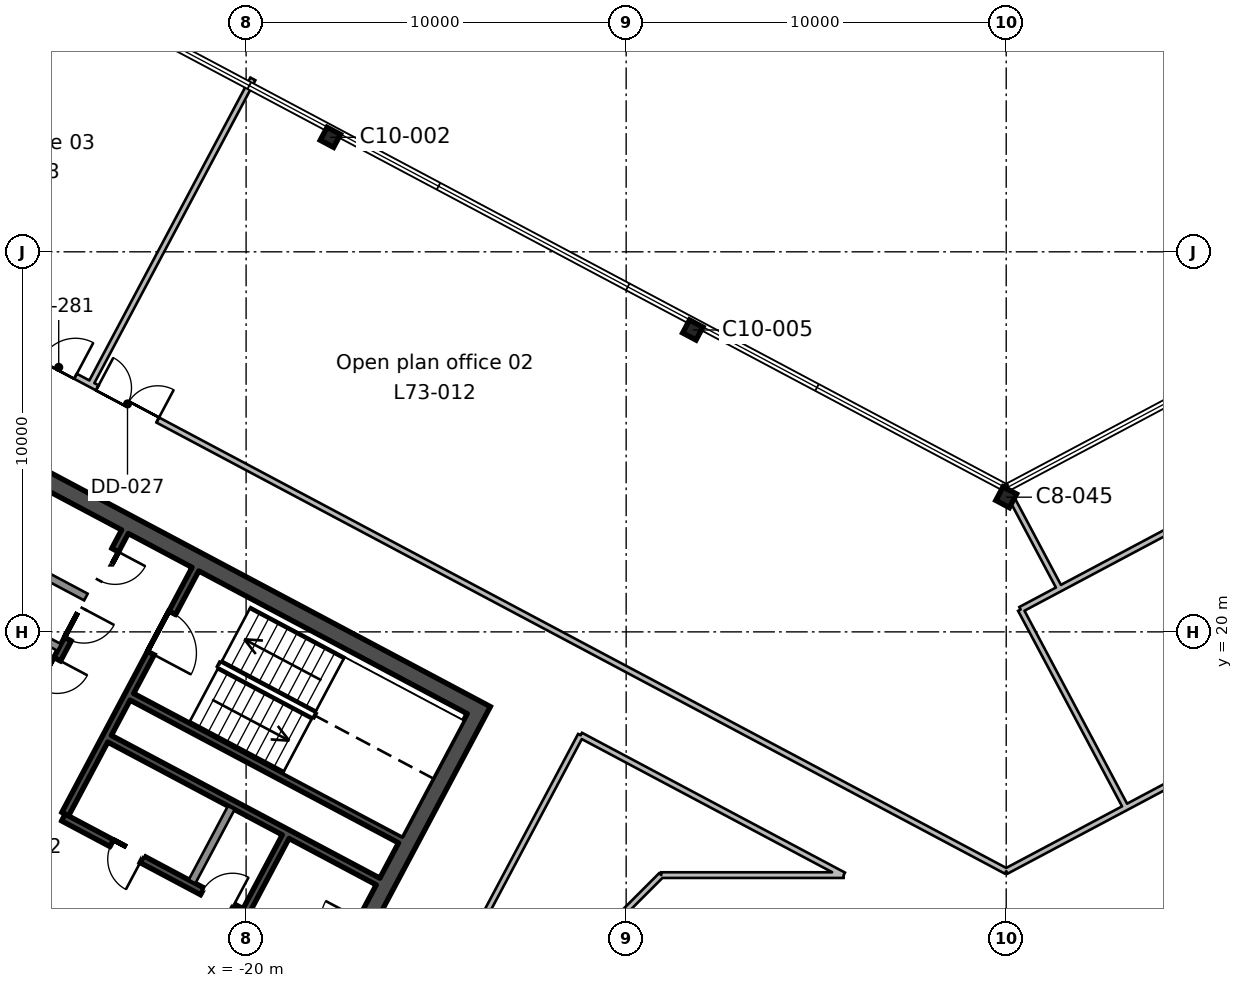
"""IFC4 building model, lengths in metres.
Left out: names, types, materials, properties, quantities, classifications, styles, units other than length and angle.
Written with IfcOpenShell. Run it as: python <this file> out.ifc"""

import sys

from ifc_helpers import new_model, si_unit, direction, frame, frame_2d, origin, origin_2d, place, context, subcontext, project, spatial, rectangle, i_section, extrude, element, fill, save


model = new_model("IFC4")
c1 = context("Model", 3, precision=1e-05, world=origin(), true_north=direction((0.0, 1.0)))
c2 = subcontext(c1, "Body", "Model", "MODEL_VIEW")
j1 = project(units=[si_unit("LENGTHUNIT", "METRE"), si_unit("PLANEANGLEUNIT", "RADIAN")], contexts=[c1])
p1 = place(None, origin())
s1 = spatial("IfcSite", under=j1, at=p1, CompositionType="ELEMENT")
p2 = place(p1, origin())
s2 = spatial("IfcBuilding", under=s1, at=p2, CompositionType="ELEMENT")
p3 = place(p2, frame((0.0, 0.0, 320.4)))
s3 = spatial("IfcBuildingStorey", under=s2, at=p3, CompositionType="ELEMENT", Elevation=320.4)
p4 = place(p3, frame((0.0, 23.544, 0.0), z_axis=(0.0, 0.0, 1.0), x_axis=(-0.882947592859, 0.469471562786, 0.0)))
e1 = element("IfcColumn", 1, at=p4, inside=s3, PredefinedType="COLUMN", context=c2, shape_type="SweptSolid", body=[
    extrude(i_section(OverallWidth=0.404, OverallDepth=0.406, WebThickness=0.027, FlangeThickness=0.044, FilletRadius=0.015, at=origin_2d()), origin(), (0.0, 0.0, 1.0), 3.9),
])
for number, where, z_axis, x_axis in (
    (2, (-8.247, 27.943, 0.0), (0.0, 0.0, 1.0), (-0.883, 0.469, 0.0)),
    (3, (-17.783, 33.013, 0.0), (0.0, 0.0, 1.0), (-0.883, 0.469, 0.0)),
):
    element("IfcColumn", number, at=place(p3, frame(where, z_axis=z_axis, x_axis=x_axis)), inside=s3, PredefinedType="COLUMN", context=c2, shape_type="SweptSolid", body=[
        extrude(i_section(OverallWidth=0.399, OverallDepth=0.386, WebThickness=0.021, FlangeThickness=0.033, FilletRadius=0.015, at=origin_2d()), origin(), (0.0, 0.0, 1.0), 3.9),
    ])
p5 = place(p3, frame((-13.771, 18.138, 0.0), z_axis=(0.0, 0.0, 1.0), x_axis=(-0.469467968382, -0.882949504028, 0.0)))
e4 = element("IfcWall", 4, at=p5, inside=s3, PredefinedType="SHEAR", context=c2, shape_type="SweptSolid", body=[
    extrude(rectangle(XDim=19.1, YDim=0.45, at=frame_2d((9.55, 0.0))), origin(), (0.0, 0.0, 1.0), 3.9),
])
p6 = place(p5, frame((6.55, 0.0, 0.0)))
e5 = element("IfcOpeningElement", 5, at=p6, cuts=e4, PredefinedType="OPENING", context=c2, shape_type="SweptSolid", body=[
    extrude(rectangle(XDim=2.4, YDim=2.4, at=frame_2d((1.2, 1.2))), frame((0.0, 0.235, 0.0), z_axis=(0.0, -1.0, 0.0), x_axis=(1.0, 0.0, 0.0)), (0.0, 0.0, 1.0), 0.47),
])
p7 = place(p3, frame((-14.076, 18.045, 0.0), z_axis=(0.0, 0.0, 1.0), x_axis=(-0.882947755831, 0.46947125628, 0.0)))
e6 = element("IfcWall", 6, at=p7, inside=s3, PredefinedType="SHEAR", context=c2, shape_type="SweptSolid", body=[
    extrude(rectangle(XDim=20.2, YDim=0.45, at=frame_2d((10.1, 0.0))), origin(), (0.0, 0.0, 1.0), 3.9),
])
p8 = place(p3, frame((-18.96, 14.611, 0.0), z_axis=(0.0, 0.0, 1.0), x_axis=(-0.4694473164, -0.882960484464, 0.0)))
e7 = element("IfcWall", 7, at=p8, inside=s3, PredefinedType="SHEAR", context=c2, shape_type="SweptSolid", body=[
    extrude(rectangle(XDim=2.2, YDim=0.2, at=frame_2d((1.1, 0.0))), origin(), (0.0, 0.0, 1.0), 3.9),
])
p9 = place(p3, frame((-20.39, 15.372, 0.0), z_axis=(0.0, 0.0, 1.0), x_axis=(-0.4694473164, -0.882960484464, 0.0)))
e8 = element("IfcWall", 8, at=p9, inside=s3, PredefinedType="SOLIDWALL", context=c2, shape_type="SweptSolid", body=[
    extrude(rectangle(XDim=2.2, YDim=0.2, at=frame_2d((1.1, 0.0))), origin(), (0.0, 0.0, 1.0), 3.9),
])
p10 = place(p3, frame((-21.333, 21.649, 0.0), z_axis=(0.0, 0.0, 1.0), x_axis=(-0.469494272526, -0.882935517501, 0.0)))
e9 = element("IfcWall", 9, at=p10, inside=s3, PredefinedType="SHEAR", context=c2, shape_type="SweptSolid", body=[
    extrude(rectangle(XDim=7.3, YDim=0.2, at=frame_2d((3.65, 0.0))), origin(), (0.0, 0.0, 1.0), 3.9),
])
p11 = place(p10, frame((1.3, 0.0, 0.0)))
e10 = element("IfcOpeningElement", 10, at=p11, cuts=e9, PredefinedType="OPENING", context=c2, shape_type="SweptSolid", body=[
    extrude(rectangle(XDim=1.2, YDim=2.1, at=frame_2d((0.6, 1.05))), frame((0.0, 0.11, 0.0), z_axis=(0.0, -1.0, 0.0), x_axis=(1.0, 0.0, 0.0)), (0.0, 0.0, 1.0), 0.22),
])
p12 = place(p3, frame((-23.188, 22.635, 0.0), z_axis=(0.0, 0.0, 1.0), x_axis=(-0.469454336211, -0.882956752176, 0.0)))
e11 = element("IfcWall", 11, at=p12, inside=s3, PredefinedType="SHEAR", context=c2, shape_type="SweptSolid", body=[
    extrude(rectangle(XDim=7.3, YDim=0.2, at=frame_2d((3.65, 0.0))), origin(), (0.0, 0.0, 1.0), 3.9),
])
p13 = place(p12, frame((0.55, 0.0, 0.0)))
e12 = element("IfcOpeningElement", 12, at=p13, cuts=e11, PredefinedType="OPENING", context=c2, shape_type="SweptSolid", body=[
    extrude(rectangle(XDim=0.9, YDim=2.1, at=frame_2d((0.45, 1.05))), frame((0.0, 0.11, 0.0), z_axis=(0.0, -1.0, 0.0), x_axis=(1.0, 0.0, 0.0)), (0.0, 0.0, 1.0), 0.22),
])
p14 = place(p12, frame((2.3, 0.0, 0.0)))
e13 = element("IfcOpeningElement", 13, at=p14, cuts=e11, PredefinedType="OPENING", context=c2, shape_type="SweptSolid", body=[
    extrude(rectangle(XDim=0.9, YDim=2.1, at=frame_2d((0.45, 1.05))), frame((0.0, 0.11, 0.0), z_axis=(0.0, -1.0, 0.0), x_axis=(1.0, 0.0, 0.0)), (0.0, 0.0, 1.0), 0.22),
])
p15 = place(p12, frame((3.8, 0.0, 0.0)))
e14 = element("IfcOpeningElement", 14, at=p15, cuts=e11, PredefinedType="OPENING", context=c2, shape_type="SweptSolid", body=[
    extrude(rectangle(XDim=0.9, YDim=2.1, at=frame_2d((0.45, 1.05))), frame((0.0, 0.11, 0.0), z_axis=(0.0, -1.0, 0.0), x_axis=(1.0, 0.0, 0.0)), (0.0, 0.0, 1.0), 0.22),
])
p16 = place(p3, frame((-24.215, 20.917, 0.0), z_axis=(0.0, 0.0, 1.0), x_axis=(-0.882964314875, 0.469440111896, 0.0)))
e15 = element("IfcWall", 15, at=p16, inside=s3, PredefinedType="SOLIDWALL", context=c2, shape_type="SweptSolid", body=[
    extrude(rectangle(XDim=5.2, YDim=0.2, at=frame_2d((2.6, 0.0))), origin(), (0.0, 0.0, 1.0), 3.9),
])
p17 = place(p3, frame((-24.919, 19.592, 0.0), z_axis=(0.0, 0.0, 1.0), x_axis=(-0.882953967957, 0.469459572775, 0.0)))
e16 = element("IfcWall", 16, at=p17, inside=s3, PredefinedType="SOLIDWALL", context=c2, shape_type="SweptSolid", body=[
    extrude(rectangle(XDim=5.2, YDim=0.2, at=frame_2d((2.6, 0.0))), origin(), (0.0, 0.0, 1.0), 3.9),
])
p18 = place(p3, frame((-15.942, 14.536, 0.0), z_axis=(0.0, 0.0, 1.0), x_axis=(-0.882946947542, 0.469472776449, 0.0)))
e17 = element("IfcWall", 17, at=p18, inside=s3, PredefinedType="SHEAR", context=c2, shape_type="SweptSolid", body=[
    extrude(rectangle(XDim=8.0, YDim=0.2, at=frame_2d((4.0, 0.0))), origin(), (0.0, 0.0, 1.0), 3.9),
])
p19 = place(p3, frame((-16.529, 13.432, 0.0), z_axis=(0.0, 0.0, 1.0), x_axis=(-0.88295287151, 0.469461634952, 0.0)))
e18 = element("IfcWall", 18, at=p19, inside=s3, PredefinedType="SHEAR", context=c2, shape_type="SweptSolid", body=[
    extrude(rectangle(XDim=8.0, YDim=0.2, at=frame_2d((4.0, 0.0))), origin(), (0.0, 0.0, 1.0), 3.9),
])
p20 = place(p3, frame((-20.04, 12.581, 0.0), z_axis=(0.0, 0.0, 1.0), x_axis=(-0.882942972946, 0.469480251476, 0.0)))
e19 = element("IfcWall", 19, at=p20, inside=s3, PredefinedType="SHEAR", context=c2, shape_type="SweptSolid", body=[
    extrude(rectangle(XDim=5.4, YDim=0.2, at=frame_2d((2.7, 0.0))), origin(), (0.0, 0.0, 1.0), 3.9),
])
p21 = place(p20, frame((0.36, 0.0, 0.0)))
e20 = element("IfcOpeningElement", 20, at=p21, cuts=e19, PredefinedType="OPENING", context=c2, shape_type="SweptSolid", body=[
    extrude(rectangle(XDim=0.9, YDim=2.1, at=frame_2d((0.45, 1.05))), frame((0.0, 0.11, 0.0), z_axis=(0.0, -1.0, 0.0), x_axis=(1.0, 0.0, 0.0)), (0.0, 0.0, 1.0), 0.22),
])
p22 = place(p20, frame((3.06, 0.0, 0.0)))
e21 = element("IfcOpeningElement", 21, at=p22, cuts=e19, PredefinedType="OPENING", context=c2, shape_type="SweptSolid", body=[
    extrude(rectangle(XDim=0.9, YDim=2.1, at=frame_2d((0.45, 1.05))), frame((0.0, 0.11, 0.0), z_axis=(0.0, -1.0, 0.0), x_axis=(1.0, 0.0, 0.0)), (0.0, 0.0, 1.0), 0.22),
])
p23 = place(p3, frame((-19.252, 8.311, 0.0), z_axis=(0.0, 0.0, 1.0), x_axis=(-0.882955722218, 0.469456273365, 0.0)))
e22 = element("IfcWall", 22, at=p23, inside=s3, PredefinedType="SHEAR", context=c2, shape_type="SweptSolid", body=[
    extrude(rectangle(XDim=10.0, YDim=0.2, at=frame_2d((5.0, 0.0))), origin(), (0.0, 0.0, 1.0), 3.9),
])
p24 = place(p23, frame((2.1, 0.0, 0.0)))
e23 = element("IfcOpeningElement", 23, at=p24, cuts=e22, PredefinedType="OPENING", context=c2, shape_type="SweptSolid", body=[
    extrude(rectangle(XDim=1.2, YDim=2.1, at=frame_2d((0.6, 1.05))), frame((0.0, 0.11, 0.0), z_axis=(0.0, -1.0, 0.0), x_axis=(1.0, 0.0, 0.0)), (0.0, 0.0, 1.0), 0.22),
])
p25 = place(p23, frame((5.4, 0.0, 0.0)))
e24 = element("IfcOpeningElement", 24, at=p25, cuts=e22, PredefinedType="OPENING", context=c2, shape_type="SweptSolid", body=[
    extrude(rectangle(XDim=1.1, YDim=2.1, at=frame_2d((0.55, 1.05))), frame((0.0, 0.11, 0.0), z_axis=(0.0, -1.0, 0.0), x_axis=(1.0, 0.0, 0.0)), (0.0, 0.0, 1.0), 0.22),
])
p26 = place(p23, frame((8.1, 0.0, 0.0)))
e25 = element("IfcOpeningElement", 25, at=p26, cuts=e22, PredefinedType="OPENING", context=c2, shape_type="SweptSolid", body=[
    extrude(rectangle(XDim=1.1, YDim=2.1, at=frame_2d((0.55, 1.05))), frame((0.0, 0.11, 0.0), z_axis=(0.0, -1.0, 0.0), x_axis=(1.0, 0.0, 0.0)), (0.0, 0.0, 1.0), 0.22),
])
p27 = place(p3, frame((-48.947, 39.73, 0.0), z_axis=(0.0, 0.0, 1.0), x_axis=(0.882945454821, -0.469475583828, 0.0)))
e26 = element("IfcWall", 26, at=p27, inside=s3, PredefinedType="PARTITIONING", context=c2, shape_type="SweptSolid", body=[
    extrude(rectangle(XDim=55.436, YDim=0.15, at=frame_2d((27.718, 0.0))), origin(), (0.0, 0.0, 1.0), 3.54),
])
p28 = place(p27, frame((28.35, 0.0, 0.0)))
e27 = element("IfcOpeningElement", 27, at=p28, cuts=e26, PredefinedType="OPENING", context=c2, shape_type="SweptSolid", body=[
    extrude(rectangle(XDim=1.8, YDim=2.1, at=frame_2d((0.9, 1.05))), frame((0.0, 0.085, 0.0), z_axis=(0.0, -1.0, 0.0), x_axis=(1.0, 0.0, 0.0)), (0.0, 0.0, 1.0), 0.17),
])
p29 = place(p27, frame((26.7, 0.0, 0.0)))
e28 = element("IfcOpeningElement", 28, at=p29, cuts=e26, PredefinedType="OPENING", context=c2, shape_type="SweptSolid", body=[
    extrude(rectangle(XDim=1.0, YDim=2.1, at=frame_2d((0.5, 1.05))), frame((0.0, 0.085, 0.0), z_axis=(0.0, -1.0, 0.0), x_axis=(1.0, 0.0, 0.0)), (0.0, 0.0, 1.0), 0.17),
])
p30 = place(p27, frame((15.65, 0.0, 0.0)))
e29 = element("IfcOpeningElement", 29, at=p30, cuts=e26, PredefinedType="OPENING", context=c2, shape_type="SweptSolid", body=[
    extrude(rectangle(XDim=1.0, YDim=2.1, at=frame_2d((0.5, 1.05))), frame((0.0, 0.085, 0.0), z_axis=(0.0, -1.0, 0.0), x_axis=(1.0, 0.0, 0.0)), (0.0, 0.0, 1.0), 0.17),
])
p31 = place(p3, frame((0.0, 13.704, 0.0), z_axis=(0.0, 0.0, 1.0), x_axis=(0.882954463269, 0.469458641196, 0.0)))
e30 = element("IfcWall", 30, at=p31, inside=s3, PredefinedType="PARTITIONING", context=c2, shape_type="SweptSolid", body=[
    extrude(rectangle(XDim=33.766, YDim=0.15, at=frame_2d((16.883, 0.0))), origin(), (0.0, 0.0, 1.0), 3.54),
])
p32 = place(p31, frame((15.95, 0.0, 0.0)))
e31 = element("IfcOpeningElement", 31, at=p32, cuts=e30, PredefinedType="OPENING", context=c2, shape_type="SweptSolid", body=[
    extrude(rectangle(XDim=1.8, YDim=2.1, at=frame_2d((0.9, 1.05))), frame((0.0, 0.085, 0.0), z_axis=(0.0, -1.0, 0.0), x_axis=(1.0, 0.0, 0.0)), (0.0, 0.0, 1.0), 0.17),
])
p33 = place(p3, frame((-19.822, 34.55, 0.0), z_axis=(0.0, 0.0, 1.0), x_axis=(-0.46943766298, -0.882965616871, 0.0)))
e32 = element("IfcWall", 32, at=p33, inside=s3, PredefinedType="PARTITIONING", context=c2, shape_type="SweptSolid", body=[
    extrude(rectangle(XDim=9.1, YDim=0.15, at=frame_2d((4.55, 0.0))), origin(), (0.0, 0.0, 1.0), 3.54),
])
p34 = place(p3, frame((2.487, 16.624, 0.0), z_axis=(0.0, 0.0, 1.0), x_axis=(0.469087751625, -0.883151561894, 0.0)))
e33 = element("IfcWall", 33, at=p34, inside=s3, PredefinedType="PARTITIONING", context=c2, shape_type="SweptSolid", body=[
    extrude(rectangle(XDim=1.411, YDim=0.15, at=frame_2d((0.706, 0.0))), origin(), (0.0, 0.0, 1.0), 3.54),
])
p35 = place(p3, frame((0.178, 23.45, 0.0), z_axis=(0.0, 0.0, 1.0), x_axis=(0.469495603372, -0.882934809833, 0.0)))
e34 = element("IfcWall", 34, at=p35, inside=s3, PredefinedType="PARTITIONING", context=c2, shape_type="SweptSolid", body=[
    extrude(rectangle(XDim=2.622, YDim=0.15, at=frame_2d((1.311, 0.0))), origin(), (0.0, 0.0, 1.0), 3.54),
])
p36 = place(p3, frame((1.405, 21.133, 0.0), z_axis=(0.0, 0.0, 1.0), x_axis=(0.882938487938, 0.46948868625, 0.0)))
e35 = element("IfcWall", 35, at=p36, inside=s3, PredefinedType="PARTITIONING", context=c2, shape_type="SweptSolid", body=[
    extrude(rectangle(XDim=22.837, YDim=0.15, at=frame_2d((11.419, 0.0))), origin(), (0.0, 0.0, 1.0), 3.54),
])
p37 = place(p3, frame((2.487, 16.624, 0.0), z_axis=(0.0, 0.0, 1.0), x_axis=(-0.469563370993, 0.882898771447, 0.0)))
e36 = element("IfcWall", 36, at=p37, inside=s3, PredefinedType="PARTITIONING", context=c2, shape_type="SweptSolid", body=[
    extrude(rectangle(XDim=4.49, YDim=0.15, at=frame_2d((2.245, 0.0))), origin(), (0.0, 0.0, 1.0), 3.54),
])
p38 = place(p3, frame((1.405, 21.133, 0.0), z_axis=(0.0, 0.0, 1.0), x_axis=(-0.882753784089, -0.469835882704, 0.0)))
e37 = element("IfcWall", 37, at=p38, inside=s3, PredefinedType="PARTITIONING", context=c2, shape_type="SweptSolid", body=[
    extrude(rectangle(XDim=1.162, YDim=0.15, at=frame_2d((0.581, 0.0))), origin(), (0.0, 0.0, 1.0), 3.54),
])
p39 = place(p3, frame((-20.588, -0.379, 0.0), z_axis=(0.0, 0.0, 1.0), x_axis=(0.469489882812, 0.882937851685, 0.0)))
e38 = element("IfcWall", 38, at=p39, inside=s3, PredefinedType="PARTITIONING", context=c2, shape_type="SweptSolid", body=[
    extrude(rectangle(XDim=20.0, YDim=0.15, at=frame_2d((10.0, 0.0))), origin(), (0.0, 0.0, 1.0), 3.54),
])
p40 = place(p39, frame((9.55, 0.0, 0.0)))
e39 = element("IfcOpeningElement", 39, at=p40, cuts=e38, PredefinedType="OPENING", context=c2, shape_type="SweptSolid", body=[
    extrude(rectangle(XDim=1.0, YDim=2.1, at=frame_2d((0.5, 1.05))), frame((0.0, 0.085, 0.0), z_axis=(0.0, -1.0, 0.0), x_axis=(1.0, 0.0, 0.0)), (0.0, 0.0, 1.0), 0.17),
])
p41 = place(p3, frame((-11.198, 17.28, 0.0), z_axis=(0.0, 0.0, 1.0), x_axis=(0.882946288452, -0.46947401601, 0.0)))
e40 = element("IfcWall", 40, at=p41, inside=s3, PredefinedType="PARTITIONING", context=c2, shape_type="SweptSolid", body=[
    extrude(rectangle(XDim=7.838, YDim=0.15, at=frame_2d((3.919, 0.0))), origin(), (0.0, 0.0, 1.0), 3.54),
])
p42 = place(p3, frame((-4.277, 13.6, 0.0), z_axis=(0.0, 0.0, 1.0), x_axis=(-1.0, 0.0, 0.0)))
e41 = element("IfcWall", 41, at=p42, inside=s3, PredefinedType="PARTITIONING", context=c2, shape_type="SweptSolid", body=[
    extrude(rectangle(XDim=4.8, YDim=0.15, at=frame_2d((2.4, 0.0))), origin(), (0.0, 0.0, 1.0), 3.54),
])
p43 = place(p3, frame((-9.077, 13.6, 0.0), z_axis=(0.0, 0.0, 1.0), x_axis=(-0.707106781187, -0.707106781187, 0.0)))
e42 = element("IfcWall", 42, at=p43, inside=s3, PredefinedType="PARTITIONING", context=c2, shape_type="SweptSolid", body=[
    extrude(rectangle(XDim=6.397, YDim=0.15, at=frame_2d((3.198, 0.0))), origin(), (0.0, 0.0, 1.0), 3.54),
])
p44 = place(p11, origin())
e43 = element("IfcDoor", 43, at=p44, inside=s3, OperationType="SINGLE_SWING_RIGHT", PredefinedType="DOOR", context=c2, shape_type="SweptSolid", body=[
    extrude(rectangle(XDim=1.2, YDim=2.1, at=frame_2d((0.6, 1.05))), frame((0.0, 0.025, 0.0), z_axis=(0.0, -1.0, 0.0), x_axis=(1.0, 0.0, 0.0)), (0.0, 0.0, 1.0), 0.05),
])
fill(e10, e43)
p45 = place(p21, frame((0.9, 0.0, 0.0), z_axis=(0.0, 0.0, 1.0), x_axis=(-1.0, 0.0, 0.0)))
e44 = element("IfcDoor", 44, at=p45, inside=s3, OperationType="SINGLE_SWING_RIGHT", PredefinedType="DOOR", context=c2, shape_type="SweptSolid", body=[
    extrude(rectangle(XDim=0.9, YDim=2.1, at=frame_2d((0.45, 1.05))), frame((0.0, 0.025, 0.0), z_axis=(0.0, -1.0, 0.0), x_axis=(1.0, 0.0, 0.0)), (0.0, 0.0, 1.0), 0.05),
])
fill(e20, e44)
p46 = place(p22, origin())
e45 = element("IfcDoor", 45, at=p46, inside=s3, OperationType="SINGLE_SWING_LEFT", PredefinedType="DOOR", context=c2, shape_type="SweptSolid", body=[
    extrude(rectangle(XDim=0.9, YDim=2.1, at=frame_2d((0.45, 1.05))), frame((0.0, 0.025, 0.0), z_axis=(0.0, -1.0, 0.0), x_axis=(1.0, 0.0, 0.0)), (0.0, 0.0, 1.0), 0.05),
])
fill(e21, e45)
p47 = place(p13, origin())
e46 = element("IfcDoor", 46, at=p47, inside=s3, OperationType="SINGLE_SWING_LEFT", PredefinedType="DOOR", context=c2, shape_type="SweptSolid", body=[
    extrude(rectangle(XDim=0.9, YDim=2.1, at=frame_2d((0.45, 1.05))), frame((0.0, 0.025, 0.0), z_axis=(0.0, -1.0, 0.0), x_axis=(1.0, 0.0, 0.0)), (0.0, 0.0, 1.0), 0.05),
])
fill(e12, e46)
p48 = place(p14, origin())
e47 = element("IfcDoor", 47, at=p48, inside=s3, OperationType="SINGLE_SWING_LEFT", PredefinedType="DOOR", context=c2, shape_type="SweptSolid", body=[
    extrude(rectangle(XDim=0.9, YDim=2.1, at=frame_2d((0.45, 1.05))), frame((0.0, 0.025, 0.0), z_axis=(0.0, -1.0, 0.0), x_axis=(1.0, 0.0, 0.0)), (0.0, 0.0, 1.0), 0.05),
])
fill(e13, e47)
p49 = place(p15, origin())
e48 = element("IfcDoor", 48, at=p49, inside=s3, OperationType="SINGLE_SWING_LEFT", PredefinedType="DOOR", context=c2, shape_type="SweptSolid", body=[
    extrude(rectangle(XDim=0.9, YDim=2.1, at=frame_2d((0.45, 1.05))), frame((0.0, 0.025, 0.0), z_axis=(0.0, -1.0, 0.0), x_axis=(1.0, 0.0, 0.0)), (0.0, 0.0, 1.0), 0.05),
])
fill(e14, e48)
p50 = place(p28, origin())
e49 = element("IfcDoor", 49, at=p50, inside=s3, OperationType="DOUBLE_DOOR_SINGLE_SWING", PredefinedType="DOOR", context=c2, shape_type="SweptSolid", body=[
    extrude(rectangle(XDim=1.8, YDim=2.1, at=frame_2d((0.9, 1.05))), frame((0.0, 0.025, 0.0), z_axis=(0.0, -1.0, 0.0), x_axis=(1.0, 0.0, 0.0)), (0.0, 0.0, 1.0), 0.05),
])
fill(e27, e49)
p51 = place(p29, origin())
e50 = element("IfcDoor", 50, at=p51, inside=s3, OperationType="SINGLE_SWING_RIGHT", PredefinedType="DOOR", context=c2, shape_type="SweptSolid", body=[
    extrude(rectangle(XDim=1.0, YDim=2.1, at=frame_2d((0.5, 1.05))), frame((0.0, 0.025, 0.0), z_axis=(0.0, -1.0, 0.0), x_axis=(1.0, 0.0, 0.0)), (0.0, 0.0, 1.0), 0.05),
])
fill(e28, e50)
save(model, sys.argv[1])
